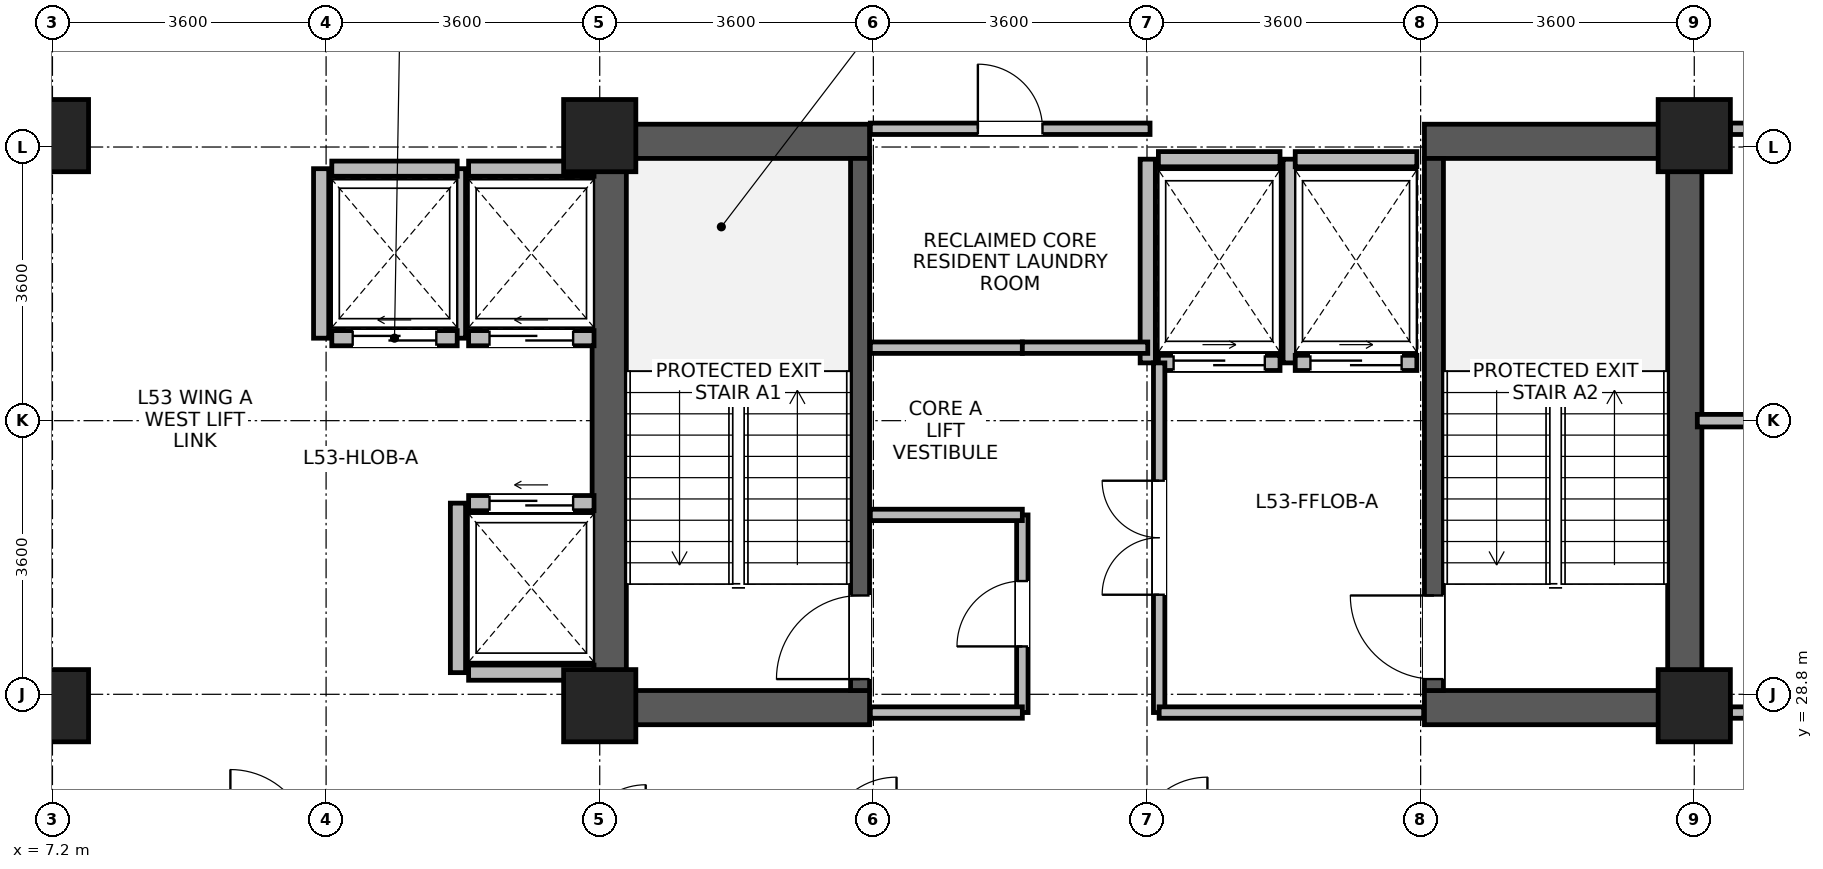
"""IFC4 building model, lengths in metres.
Left out: names, types, materials, properties, quantities, classifications, styles, units other than length and angle.
Written with IfcOpenShell. Run it as: python <this file> out.ifc"""

import sys

from ifc_helpers import new_model, si_unit, direction, frame, frame_2d, origin, origin_2d, place, context, subcontext, project, spatial, rectangle, extrude, source, transform, mapped, element, fill, save


model = new_model("IFC4")
c1 = context("Model", 3, precision=1e-05, world=origin(), true_north=direction((0.0, 1.0)))
c2 = subcontext(c1, "Body", "Model", "MODEL_VIEW")
j1 = project(units=[si_unit("LENGTHUNIT", "METRE"), si_unit("PLANEANGLEUNIT", "RADIAN")], contexts=[c1])
p1 = place(None, origin())
s1 = spatial("IfcSite", under=j1, at=p1, CompositionType="ELEMENT")
p2 = place(p1, origin())
s2 = spatial("IfcBuilding", under=s1, at=p2, CompositionType="ELEMENT")
p3 = place(p2, frame((0.0, 0.0, 209.2)))
s3 = spatial("IfcBuildingStorey", under=s2, at=p3, CompositionType="ELEMENT", Elevation=209.2)
for number, where, z_axis, x_axis in (
    (1, (14.525, 28.4, 0.0), (0.0, 0.0, 1.0), (0.0, 1.0, 0.0)),
    (2, (28.675, 28.4, 0.0), (0.0, 0.0, 1.0), (0.0, 1.0, 0.0)),
):
    element("IfcWall", number, at=place(p3, frame(where, z_axis=z_axis, x_axis=x_axis)), inside=s3, PredefinedType="SHEAR", context=c2, shape_type="SweptSolid", body=[
        extrude(rectangle(XDim=7.9, YDim=0.45, at=frame_2d((3.95, 0.0))), origin(), (0.0, 0.0, 1.0), 3.47),
    ])
for number, where, z_axis, x_axis in (
    (3, (14.75, 28.625, 0.0), (0.0, 0.0, 1.0), (1.0, 0.0, 0.0)),
    (4, (25.25, 28.625, 0.0), (0.0, 0.0, 1.0), (1.0, 0.0, 0.0)),
    (5, (14.75, 36.075, 0.0), (0.0, 0.0, 1.0), (1.0, 0.0, 0.0)),
    (6, (25.25, 36.075, 0.0), (0.0, 0.0, 1.0), (1.0, 0.0, 0.0)),
):
    element("IfcWall", number, at=place(p3, frame(where, z_axis=z_axis, x_axis=x_axis)), inside=s3, PredefinedType="SHEAR", context=c2, shape_type="SweptSolid", body=[
        extrude(rectangle(XDim=3.2, YDim=0.45, at=frame_2d((1.6, 0.0))), origin(), (0.0, 0.0, 1.0), 3.47),
    ])
p4 = place(p3, frame((17.825, 28.85, 0.0), z_axis=(0.0, 0.0, 1.0), x_axis=(0.0, 1.0, 0.0)))
e7 = element("IfcWall", 7, at=p4, inside=s3, PredefinedType="SHEAR", context=c2, shape_type="SweptSolid", body=[
    extrude(rectangle(XDim=7.0, YDim=0.25, at=frame_2d((3.5, 0.0))), origin(), (0.0, 0.0, 1.0), 3.47),
])
p5 = place(p4, frame((0.15, 0.0, 0.0)))
e8 = element("IfcOpeningElement", 8, at=p5, cuts=e7, PredefinedType="OPENING", context=c2, shape_type="SweptSolid", body=[
    extrude(rectangle(XDim=1.1, YDim=2.08, at=frame_2d((0.55, 1.04))), frame((0.0, 0.135, 0.0), z_axis=(0.0, -1.0, 0.0), x_axis=(1.0, 0.0, 0.0)), (0.0, 0.0, 1.0), 0.27),
])
p6 = place(p3, frame((25.375, 28.85, 0.0), z_axis=(0.0, 0.0, 1.0), x_axis=(0.0, 1.0, 0.0)))
e9 = element("IfcWall", 9, at=p6, inside=s3, PredefinedType="SHEAR", context=c2, shape_type="SweptSolid", body=[
    extrude(rectangle(XDim=7.0, YDim=0.25, at=frame_2d((3.5, 0.0))), origin(), (0.0, 0.0, 1.0), 3.47),
])
p7 = place(p6, frame((0.15, 0.0, 0.0)))
e10 = element("IfcOpeningElement", 10, at=p7, cuts=e9, PredefinedType="OPENING", context=c2, shape_type="SweptSolid", body=[
    extrude(rectangle(XDim=1.1, YDim=2.08, at=frame_2d((0.55, 1.04))), frame((0.0, 0.135, 0.0), z_axis=(0.0, -1.0, 0.0), x_axis=(1.0, 0.0, 0.0)), (0.0, 0.0, 1.0), 0.27),
])
m1 = source(origin(), c2, "Body", "SweptSolid", [
    extrude(rectangle(XDim=0.95, YDim=0.95, at=origin_2d()), origin(), (0.0, 0.0, 1.0), 3.7),
])
for number, where, z_axis, x_axis in (
    (11, (7.2, 28.65, 0.0), (0.0, 0.0, 1.0), (1.0, 0.0, 0.0)),
    (12, (7.2, 36.15, 0.0), (0.0, 0.0, 1.0), (1.0, 0.0, 0.0)),
    (13, (14.4, 28.65, 0.0), (0.0, 0.0, 1.0), (1.0, 0.0, 0.0)),
    (14, (14.4, 36.15, 0.0), (0.0, 0.0, 1.0), (1.0, 0.0, 0.0)),
    (15, (28.8, 28.65, 0.0), (0.0, 0.0, 1.0), (1.0, 0.0, 0.0)),
    (16, (28.8, 36.15, 0.0), (0.0, 0.0, 1.0), (1.0, 0.0, 0.0)),
):
    element("IfcColumn", number, at=place(p3, frame(where, z_axis=z_axis, x_axis=x_axis)), inside=s3, PredefinedType="COLUMN", context=c2, shape_type="MappedRepresentation", body=[
        mapped(m1, transform((0.0, 0.0, 0.0), x_axis=(1.0, 0.0, 0.0), y_axis=(0.0, 1.0, 0.0), z_axis=(0.0, 0.0, 1.0), scale=1.0)),
    ])
p8 = place(p3, frame((12.675, 33.485, 0.0), z_axis=(0.0, 0.0, 1.0), x_axis=(1.0, 0.0, 0.0)))
e17 = element("IfcWall", 17, at=p8, inside=s3, PredefinedType="PARTITIONING", context=c2, shape_type="SweptSolid", body=[
    extrude(rectangle(XDim=1.65, YDim=0.2, at=frame_2d((0.825, 0.0))), origin(), (0.0, 0.0, 1.0), 3.45),
])
p9 = place(p8, frame((0.275, 0.0, 0.0)))
e18 = element("IfcOpeningElement", 18, at=p9, cuts=e17, PredefinedType="OPENING", context=c2, shape_type="SweptSolid", body=[
    extrude(rectangle(XDim=1.1, YDim=2.12, at=frame_2d((0.55, 1.06))), frame((0.0, 0.11, 0.0), z_axis=(0.0, -1.0, 0.0), x_axis=(1.0, 0.0, 0.0)), (0.0, 0.0, 1.0), 0.22),
])
p10 = place(p3, frame((12.675, 35.715, 0.0), z_axis=(0.0, 0.0, 1.0), x_axis=(1.0, 0.0, 0.0)))
e19 = element("IfcWall", 19, at=p10, inside=s3, PredefinedType="PARTITIONING", context=c2, shape_type="SweptSolid", body=[
    extrude(rectangle(XDim=1.65, YDim=0.2, at=frame_2d((0.825, 0.0))), origin(), (0.0, 0.0, 1.0), 3.45),
])
p11 = place(p3, frame((12.535, 33.485, 0.0), z_axis=(0.0, 0.0, 1.0), x_axis=(0.0, 1.0, 0.0)))
e20 = element("IfcWall", 20, at=p11, inside=s3, PredefinedType="PARTITIONING", context=c2, shape_type="SweptSolid", body=[
    extrude(rectangle(XDim=2.23, YDim=0.2, at=frame_2d((1.115, 0.0))), origin(), (0.0, 0.0, 1.0), 3.45),
])
p12 = place(p3, frame((12.675, 29.085, 0.0), z_axis=(0.0, 0.0, 1.0), x_axis=(1.0, 0.0, 0.0)))
e21 = element("IfcWall", 21, at=p12, inside=s3, PredefinedType="PARTITIONING", context=c2, shape_type="SweptSolid", body=[
    extrude(rectangle(XDim=1.65, YDim=0.2, at=frame_2d((0.825, 0.0))), origin(), (0.0, 0.0, 1.0), 3.45),
])
p13 = place(p3, frame((12.675, 31.315, 0.0), z_axis=(0.0, 0.0, 1.0), x_axis=(1.0, 0.0, 0.0)))
e22 = element("IfcWall", 22, at=p13, inside=s3, PredefinedType="PARTITIONING", context=c2, shape_type="SweptSolid", body=[
    extrude(rectangle(XDim=1.65, YDim=0.2, at=frame_2d((0.825, 0.0))), origin(), (0.0, 0.0, 1.0), 3.45),
])
p14 = place(p13, frame((0.275, 0.0, 0.0)))
e23 = element("IfcOpeningElement", 23, at=p14, cuts=e22, PredefinedType="OPENING", context=c2, shape_type="SweptSolid", body=[
    extrude(rectangle(XDim=1.1, YDim=2.12, at=frame_2d((0.55, 1.06))), frame((0.0, 0.11, 0.0), z_axis=(0.0, -1.0, 0.0), x_axis=(1.0, 0.0, 0.0)), (0.0, 0.0, 1.0), 0.22),
])
p15 = place(p3, frame((12.535, 29.085, 0.0), z_axis=(0.0, 0.0, 1.0), x_axis=(0.0, 1.0, 0.0)))
e24 = element("IfcWall", 24, at=p15, inside=s3, PredefinedType="PARTITIONING", context=c2, shape_type="SweptSolid", body=[
    extrude(rectangle(XDim=2.23, YDim=0.2, at=frame_2d((1.115, 0.0))), origin(), (0.0, 0.0, 1.0), 3.45),
])
p16 = place(p3, frame((10.875, 33.485, 0.0), z_axis=(0.0, 0.0, 1.0), x_axis=(1.0, 0.0, 0.0)))
e25 = element("IfcWall", 25, at=p16, inside=s3, PredefinedType="PARTITIONING", context=c2, shape_type="SweptSolid", body=[
    extrude(rectangle(XDim=1.65, YDim=0.2, at=frame_2d((0.825, 0.0))), origin(), (0.0, 0.0, 1.0), 3.45),
])
p17 = place(p16, frame((0.275, 0.0, 0.0)))
e26 = element("IfcOpeningElement", 26, at=p17, cuts=e25, PredefinedType="OPENING", context=c2, shape_type="SweptSolid", body=[
    extrude(rectangle(XDim=1.1, YDim=2.12, at=frame_2d((0.55, 1.06))), frame((0.0, 0.11, 0.0), z_axis=(0.0, -1.0, 0.0), x_axis=(1.0, 0.0, 0.0)), (0.0, 0.0, 1.0), 0.22),
])
p18 = place(p3, frame((10.875, 35.715, 0.0), z_axis=(0.0, 0.0, 1.0), x_axis=(1.0, 0.0, 0.0)))
e27 = element("IfcWall", 27, at=p18, inside=s3, PredefinedType="PARTITIONING", context=c2, shape_type="SweptSolid", body=[
    extrude(rectangle(XDim=1.65, YDim=0.2, at=frame_2d((0.825, 0.0))), origin(), (0.0, 0.0, 1.0), 3.45),
])
p19 = place(p3, frame((10.735, 33.485, 0.0), z_axis=(0.0, 0.0, 1.0), x_axis=(0.0, 1.0, 0.0)))
e28 = element("IfcWall", 28, at=p19, inside=s3, PredefinedType="PARTITIONING", context=c2, shape_type="SweptSolid", body=[
    extrude(rectangle(XDim=2.23, YDim=0.2, at=frame_2d((1.115, 0.0))), origin(), (0.0, 0.0, 1.0), 3.45),
])
p20 = place(p3, frame((21.75, 33.16, 0.0), z_axis=(0.0, 0.0, 1.0), x_axis=(1.0, 0.0, 0.0)))
e29 = element("IfcWall", 29, at=p20, inside=s3, PredefinedType="PARTITIONING", context=c2, shape_type="SweptSolid", body=[
    extrude(rectangle(XDim=1.6, YDim=0.2, at=frame_2d((0.8, 0.0))), origin(), (0.0, 0.0, 1.0), 3.45),
])
p21 = place(p20, frame((0.2, 0.0, 0.0)))
e30 = element("IfcOpeningElement", 30, at=p21, cuts=e29, PredefinedType="OPENING", context=c2, shape_type="SweptSolid", body=[
    extrude(rectangle(XDim=1.2, YDim=2.12, at=frame_2d((0.6, 1.06))), frame((0.0, 0.11, 0.0), z_axis=(0.0, -1.0, 0.0), x_axis=(1.0, 0.0, 0.0)), (0.0, 0.0, 1.0), 0.22),
])
p22 = place(p3, frame((21.75, 35.84, 0.0), z_axis=(0.0, 0.0, 1.0), x_axis=(1.0, 0.0, 0.0)))
e31 = element("IfcWall", 31, at=p22, inside=s3, PredefinedType="PARTITIONING", context=c2, shape_type="SweptSolid", body=[
    extrude(rectangle(XDim=1.6, YDim=0.2, at=frame_2d((0.8, 0.0))), origin(), (0.0, 0.0, 1.0), 2.45),
])
for number, where, z_axis, x_axis in (
    (32, (21.61, 33.16, 0.0), (0.0, 0.0, 1.0), (0.0, 1.0, 0.0)),
    (33, (23.49, 33.16, 0.0), (0.0, 0.0, 1.0), (0.0, 1.0, 0.0)),
):
    element("IfcWall", number, at=place(p3, frame(where, z_axis=z_axis, x_axis=x_axis)), inside=s3, PredefinedType="PARTITIONING", context=c2, shape_type="SweptSolid", body=[
        extrude(rectangle(XDim=2.68, YDim=0.2, at=frame_2d((1.34, 0.0))), origin(), (0.0, 0.0, 1.0), 3.45),
    ])
p23 = place(p3, frame((23.55, 33.16, 0.0), z_axis=(0.0, 0.0, 1.0), x_axis=(1.0, 0.0, 0.0)))
e34 = element("IfcWall", 34, at=p23, inside=s3, PredefinedType="PARTITIONING", context=c2, shape_type="SweptSolid", body=[
    extrude(rectangle(XDim=1.6, YDim=0.2, at=frame_2d((0.8, 0.0))), origin(), (0.0, 0.0, 1.0), 3.45),
])
p24 = place(p23, frame((0.2, 0.0, 0.0)))
e35 = element("IfcOpeningElement", 35, at=p24, cuts=e34, PredefinedType="OPENING", context=c2, shape_type="SweptSolid", body=[
    extrude(rectangle(XDim=1.2, YDim=2.12, at=frame_2d((0.6, 1.06))), frame((0.0, 0.11, 0.0), z_axis=(0.0, -1.0, 0.0), x_axis=(1.0, 0.0, 0.0)), (0.0, 0.0, 1.0), 0.22),
])
p25 = place(p3, frame((23.55, 35.84, 0.0), z_axis=(0.0, 0.0, 1.0), x_axis=(1.0, 0.0, 0.0)))
e36 = element("IfcWall", 36, at=p25, inside=s3, PredefinedType="PARTITIONING", context=c2, shape_type="SweptSolid", body=[
    extrude(rectangle(XDim=1.6, YDim=0.2, at=frame_2d((0.8, 0.0))), origin(), (0.0, 0.0, 1.0), 2.45),
])
p26 = place(p3, frame((29.275, 28.56, 0.0), z_axis=(0.0, 0.0, 1.0), x_axis=(1.0, 0.0, 0.0)))
e37 = element("IfcWall", 37, at=p26, inside=s3, PredefinedType="PARTITIONING", context=c2, shape_type="SweptSolid", body=[
    extrude(rectangle(XDim=4.085, YDim=0.15, at=frame_2d((2.042, 0.0))), origin(), (0.0, 0.0, 1.0), 2.85),
])
p27 = place(p26, frame((1.613, 0.0, 0.0)))
e38 = element("IfcOpeningElement", 38, at=p27, cuts=e37, PredefinedType="OPENING", context=c2, shape_type="SweptSolid", body=[
    extrude(rectangle(XDim=0.86, YDim=2.02, at=frame_2d((0.43, 1.01))), frame((0.0, 0.085, 0.0), z_axis=(0.0, -1.0, 0.0), x_axis=(1.0, 0.0, 0.0)), (0.0, 0.0, 1.0), 0.17),
])
p28 = place(p3, frame((29.275, 36.24, 0.0), z_axis=(0.0, 0.0, 1.0), x_axis=(1.0, 0.0, 0.0)))
e39 = element("IfcWall", 39, at=p28, inside=s3, PredefinedType="PARTITIONING", context=c2, shape_type="SweptSolid", body=[
    extrude(rectangle(XDim=4.085, YDim=0.15, at=frame_2d((2.042, 0.0))), origin(), (0.0, 0.0, 1.0), 2.85),
])
p29 = place(p28, frame((1.393, 0.0, 0.0)))
e40 = element("IfcOpeningElement", 40, at=p29, cuts=e39, PredefinedType="OPENING", context=c2, shape_type="SweptSolid", body=[
    extrude(rectangle(XDim=1.3, YDim=2.12, at=frame_2d((0.65, 1.06))), frame((0.0, 0.085, 0.0), z_axis=(0.0, -1.0, 0.0), x_axis=(1.0, 0.0, 0.0)), (0.0, 0.0, 1.0), 0.17),
])
p30 = place(p3, frame((17.96, 36.24, 0.0), z_axis=(0.0, 0.0, 1.0), x_axis=(1.0, 0.0, 0.0)))
e41 = element("IfcWall", 41, at=p30, inside=s3, PredefinedType="PARTITIONING", context=c2, shape_type="SweptSolid", body=[
    extrude(rectangle(XDim=3.68, YDim=0.15, at=frame_2d((1.84, 0.0))), origin(), (0.0, 0.0, 1.0), 2.45),
])
p31 = place(p30, frame((1.415, 0.0, 0.0)))
e42 = element("IfcOpeningElement", 42, at=p31, cuts=e41, PredefinedType="OPENING", context=c2, shape_type="SweptSolid", body=[
    extrude(rectangle(XDim=0.85, YDim=2.04, at=frame_2d((0.425, 1.02))), frame((0.0, 0.085, 0.0), z_axis=(0.0, -1.0, 0.0), x_axis=(1.0, 0.0, 0.0)), (0.0, 0.0, 1.0), 0.17),
])
p32 = place(p3, frame((19.96, 28.56, 0.0), z_axis=(0.0, 0.0, 1.0), x_axis=(0.0, 1.0, 0.0)))
e43 = element("IfcWall", 43, at=p32, inside=s3, PredefinedType="PARTITIONING", context=c2, shape_type="SweptSolid", body=[
    extrude(rectangle(XDim=2.6, YDim=0.15, at=frame_2d((1.3, 0.0))), origin(), (0.0, 0.0, 1.0), 3.45),
])
p33 = place(p32, frame((0.87, 0.0, 0.0)))
e44 = element("IfcOpeningElement", 44, at=p33, cuts=e43, PredefinedType="OPENING", context=c2, shape_type="SweptSolid", body=[
    extrude(rectangle(XDim=0.86, YDim=2.02, at=frame_2d((0.43, 1.01))), frame((0.0, 0.085, 0.0), z_axis=(0.0, -1.0, 0.0), x_axis=(1.0, 0.0, 0.0)), (0.0, 0.0, 1.0), 0.17),
])
p34 = place(p3, frame((17.96, 28.56, 0.0), z_axis=(0.0, 0.0, 1.0), x_axis=(1.0, 0.0, 0.0)))
e45 = element("IfcWall", 45, at=p34, inside=s3, PredefinedType="PARTITIONING", context=c2, shape_type="SweptSolid", body=[
    extrude(rectangle(XDim=2.0, YDim=0.15, at=frame_2d((1.0, 0.0))), origin(), (0.0, 0.0, 1.0), 2.45),
])
for number, where, z_axis, x_axis in (
    (46, (17.96, 31.16, 0.0), (0.0, 0.0, 1.0), (1.0, 0.0, 0.0)),
    (47, (17.96, 33.36, 0.0), (0.0, 0.0, 1.0), (1.0, 0.0, 0.0)),
):
    element("IfcWall", number, at=place(p3, frame(where, z_axis=z_axis, x_axis=x_axis)), inside=s3, PredefinedType="PARTITIONING", context=c2, shape_type="SweptSolid", body=[
        extrude(rectangle(XDim=2.0, YDim=0.15, at=frame_2d((1.0, 0.0))), origin(), (0.0, 0.0, 1.0), 3.45),
    ])
p35 = place(p3, frame((19.96, 33.36, 0.0), z_axis=(0.0, 0.0, 1.0), x_axis=(1.0, 0.0, 0.0)))
e48 = element("IfcWall", 48, at=p35, inside=s3, PredefinedType="PARTITIONING", context=c2, shape_type="SweptSolid", body=[
    extrude(rectangle(XDim=1.65, YDim=0.15, at=frame_2d((0.825, 0.0))), origin(), (0.0, 0.0, 1.0), 3.45),
])
p36 = place(p3, frame((21.76, 28.56, 0.0), z_axis=(0.0, 0.0, 1.0), x_axis=(0.0, 1.0, 0.0)))
e49 = element("IfcWall", 49, at=p36, inside=s3, PredefinedType="PARTITIONING", context=c2, shape_type="SweptSolid", body=[
    extrude(rectangle(XDim=4.6, YDim=0.15, at=frame_2d((2.3, 0.0))), origin(), (0.0, 0.0, 1.0), 3.45),
])
p37 = place(p36, frame((1.55, 0.0, 0.0)))
e50 = element("IfcOpeningElement", 50, at=p37, cuts=e49, PredefinedType="OPENING", context=c2, shape_type="SweptSolid", body=[
    extrude(rectangle(XDim=1.5, YDim=2.1, at=frame_2d((0.75, 1.05))), frame((0.0, 0.085, 0.0), z_axis=(0.0, -1.0, 0.0), x_axis=(1.0, 0.0, 0.0)), (0.0, 0.0, 1.0), 0.17),
])
p38 = place(p3, frame((28.84, 32.4, 0.0), z_axis=(0.0, 0.0, 1.0), x_axis=(1.0, 0.0, 0.0)))
e51 = element("IfcWall", 51, at=p38, inside=s3, PredefinedType="PARTITIONING", context=c2, shape_type="SweptSolid", body=[
    extrude(rectangle(XDim=4.52, YDim=0.165, at=frame_2d((2.26, 0.0))), origin(), (0.0, 0.0, 1.0), 3.45),
])
p39 = place(p3, frame((21.76, 28.56, 0.0), z_axis=(0.0, 0.0, 1.0), x_axis=(1.0, 0.0, 0.0)))
e52 = element("IfcWall", 52, at=p39, inside=s3, PredefinedType="PARTITIONING", context=c2, shape_type="SweptSolid", body=[
    extrude(rectangle(XDim=3.48, YDim=0.15, at=frame_2d((1.74, 0.0))), origin(), (0.0, 0.0, 1.0), 2.45),
])
p40 = place(p5, origin())
e53 = element("IfcDoor", 53, at=p40, inside=s3, OperationType="SINGLE_SWING_LEFT", PredefinedType="DOOR", context=c2, shape_type="SweptSolid", body=[
    extrude(rectangle(XDim=1.1, YDim=2.08, at=frame_2d((0.55, 1.04))), frame((0.0, 0.025, 0.0), z_axis=(0.0, -1.0, 0.0), x_axis=(1.0, 0.0, 0.0)), (0.0, 0.0, 1.0), 0.05),
])
fill(e8, e53)
p41 = place(p7, origin())
e54 = element("IfcDoor", 54, at=p41, inside=s3, OperationType="SINGLE_SWING_RIGHT", PredefinedType="DOOR", context=c2, shape_type="SweptSolid", body=[
    extrude(rectangle(XDim=1.1, YDim=2.08, at=frame_2d((0.55, 1.04))), frame((0.0, 0.025, 0.0), z_axis=(0.0, -1.0, 0.0), x_axis=(1.0, 0.0, 0.0)), (0.0, 0.0, 1.0), 0.05),
])
fill(e10, e54)
p42 = place(p9, origin())
e55 = element("IfcDoor", 55, at=p42, inside=s3, OperationType="SLIDING_TO_LEFT", PredefinedType="DOOR", context=c2, shape_type="SweptSolid", body=[
    extrude(rectangle(XDim=1.1, YDim=2.12, at=frame_2d((0.55, 1.06))), frame((0.0, 0.025, 0.0), z_axis=(0.0, -1.0, 0.0), x_axis=(1.0, 0.0, 0.0)), (0.0, 0.0, 1.0), 0.05),
])
fill(e18, e55)
p43 = place(p14, origin())
e56 = element("IfcDoor", 56, at=p43, inside=s3, OperationType="SLIDING_TO_LEFT", PredefinedType="DOOR", context=c2, shape_type="SweptSolid", body=[
    extrude(rectangle(XDim=1.1, YDim=2.12, at=frame_2d((0.55, 1.06))), frame((0.0, 0.025, 0.0), z_axis=(0.0, -1.0, 0.0), x_axis=(1.0, 0.0, 0.0)), (0.0, 0.0, 1.0), 0.05),
])
fill(e23, e56)
p44 = place(p17, origin())
e57 = element("IfcDoor", 57, at=p44, inside=s3, OperationType="SLIDING_TO_LEFT", PredefinedType="DOOR", context=c2, shape_type="SweptSolid", body=[
    extrude(rectangle(XDim=1.1, YDim=2.12, at=frame_2d((0.55, 1.06))), frame((0.0, 0.025, 0.0), z_axis=(0.0, -1.0, 0.0), x_axis=(1.0, 0.0, 0.0)), (0.0, 0.0, 1.0), 0.05),
])
fill(e26, e57)
p45 = place(p21, origin())
e58 = element("IfcDoor", 58, at=p45, inside=s3, OperationType="SLIDING_TO_RIGHT", PredefinedType="DOOR", context=c2, shape_type="SweptSolid", body=[
    extrude(rectangle(XDim=1.2, YDim=2.12, at=frame_2d((0.6, 1.06))), frame((0.0, 0.025, 0.0), z_axis=(0.0, -1.0, 0.0), x_axis=(1.0, 0.0, 0.0)), (0.0, 0.0, 1.0), 0.05),
])
fill(e30, e58)
p46 = place(p24, origin())
e59 = element("IfcDoor", 59, at=p46, inside=s3, OperationType="SLIDING_TO_RIGHT", PredefinedType="DOOR", context=c2, shape_type="SweptSolid", body=[
    extrude(rectangle(XDim=1.2, YDim=2.12, at=frame_2d((0.6, 1.06))), frame((0.0, 0.025, 0.0), z_axis=(0.0, -1.0, 0.0), x_axis=(1.0, 0.0, 0.0)), (0.0, 0.0, 1.0), 0.05),
])
fill(e35, e59)
p47 = place(p31, origin())
e60 = element("IfcDoor", 60, at=p47, inside=s3, OperationType="SINGLE_SWING_LEFT", PredefinedType="DOOR", context=c2, shape_type="SweptSolid", body=[
    extrude(rectangle(XDim=0.85, YDim=2.04, at=frame_2d((0.425, 1.02))), frame((0.0, 0.025, 0.0), z_axis=(0.0, -1.0, 0.0), x_axis=(1.0, 0.0, 0.0)), (0.0, 0.0, 1.0), 0.05),
])
fill(e42, e60)
p48 = place(p33, origin())
e61 = element("IfcDoor", 61, at=p48, inside=s3, OperationType="SINGLE_SWING_LEFT", PredefinedType="DOOR", context=c2, shape_type="SweptSolid", body=[
    extrude(rectangle(XDim=0.86, YDim=2.02, at=frame_2d((0.43, 1.01))), frame((0.0, 0.025, 0.0), z_axis=(0.0, -1.0, 0.0), x_axis=(1.0, 0.0, 0.0)), (0.0, 0.0, 1.0), 0.05),
])
fill(e44, e61)
p49 = place(p37, origin())
e62 = element("IfcDoor", 62, at=p49, inside=s3, OperationType="DOUBLE_DOOR_SINGLE_SWING", PredefinedType="DOOR", context=c2, shape_type="SweptSolid", body=[
    extrude(rectangle(XDim=1.5, YDim=2.1, at=frame_2d((0.75, 1.05))), frame((0.0, 0.025, 0.0), z_axis=(0.0, -1.0, 0.0), x_axis=(1.0, 0.0, 0.0)), (0.0, 0.0, 1.0), 0.05),
])
fill(e50, e62)
save(model, sys.argv[1])
